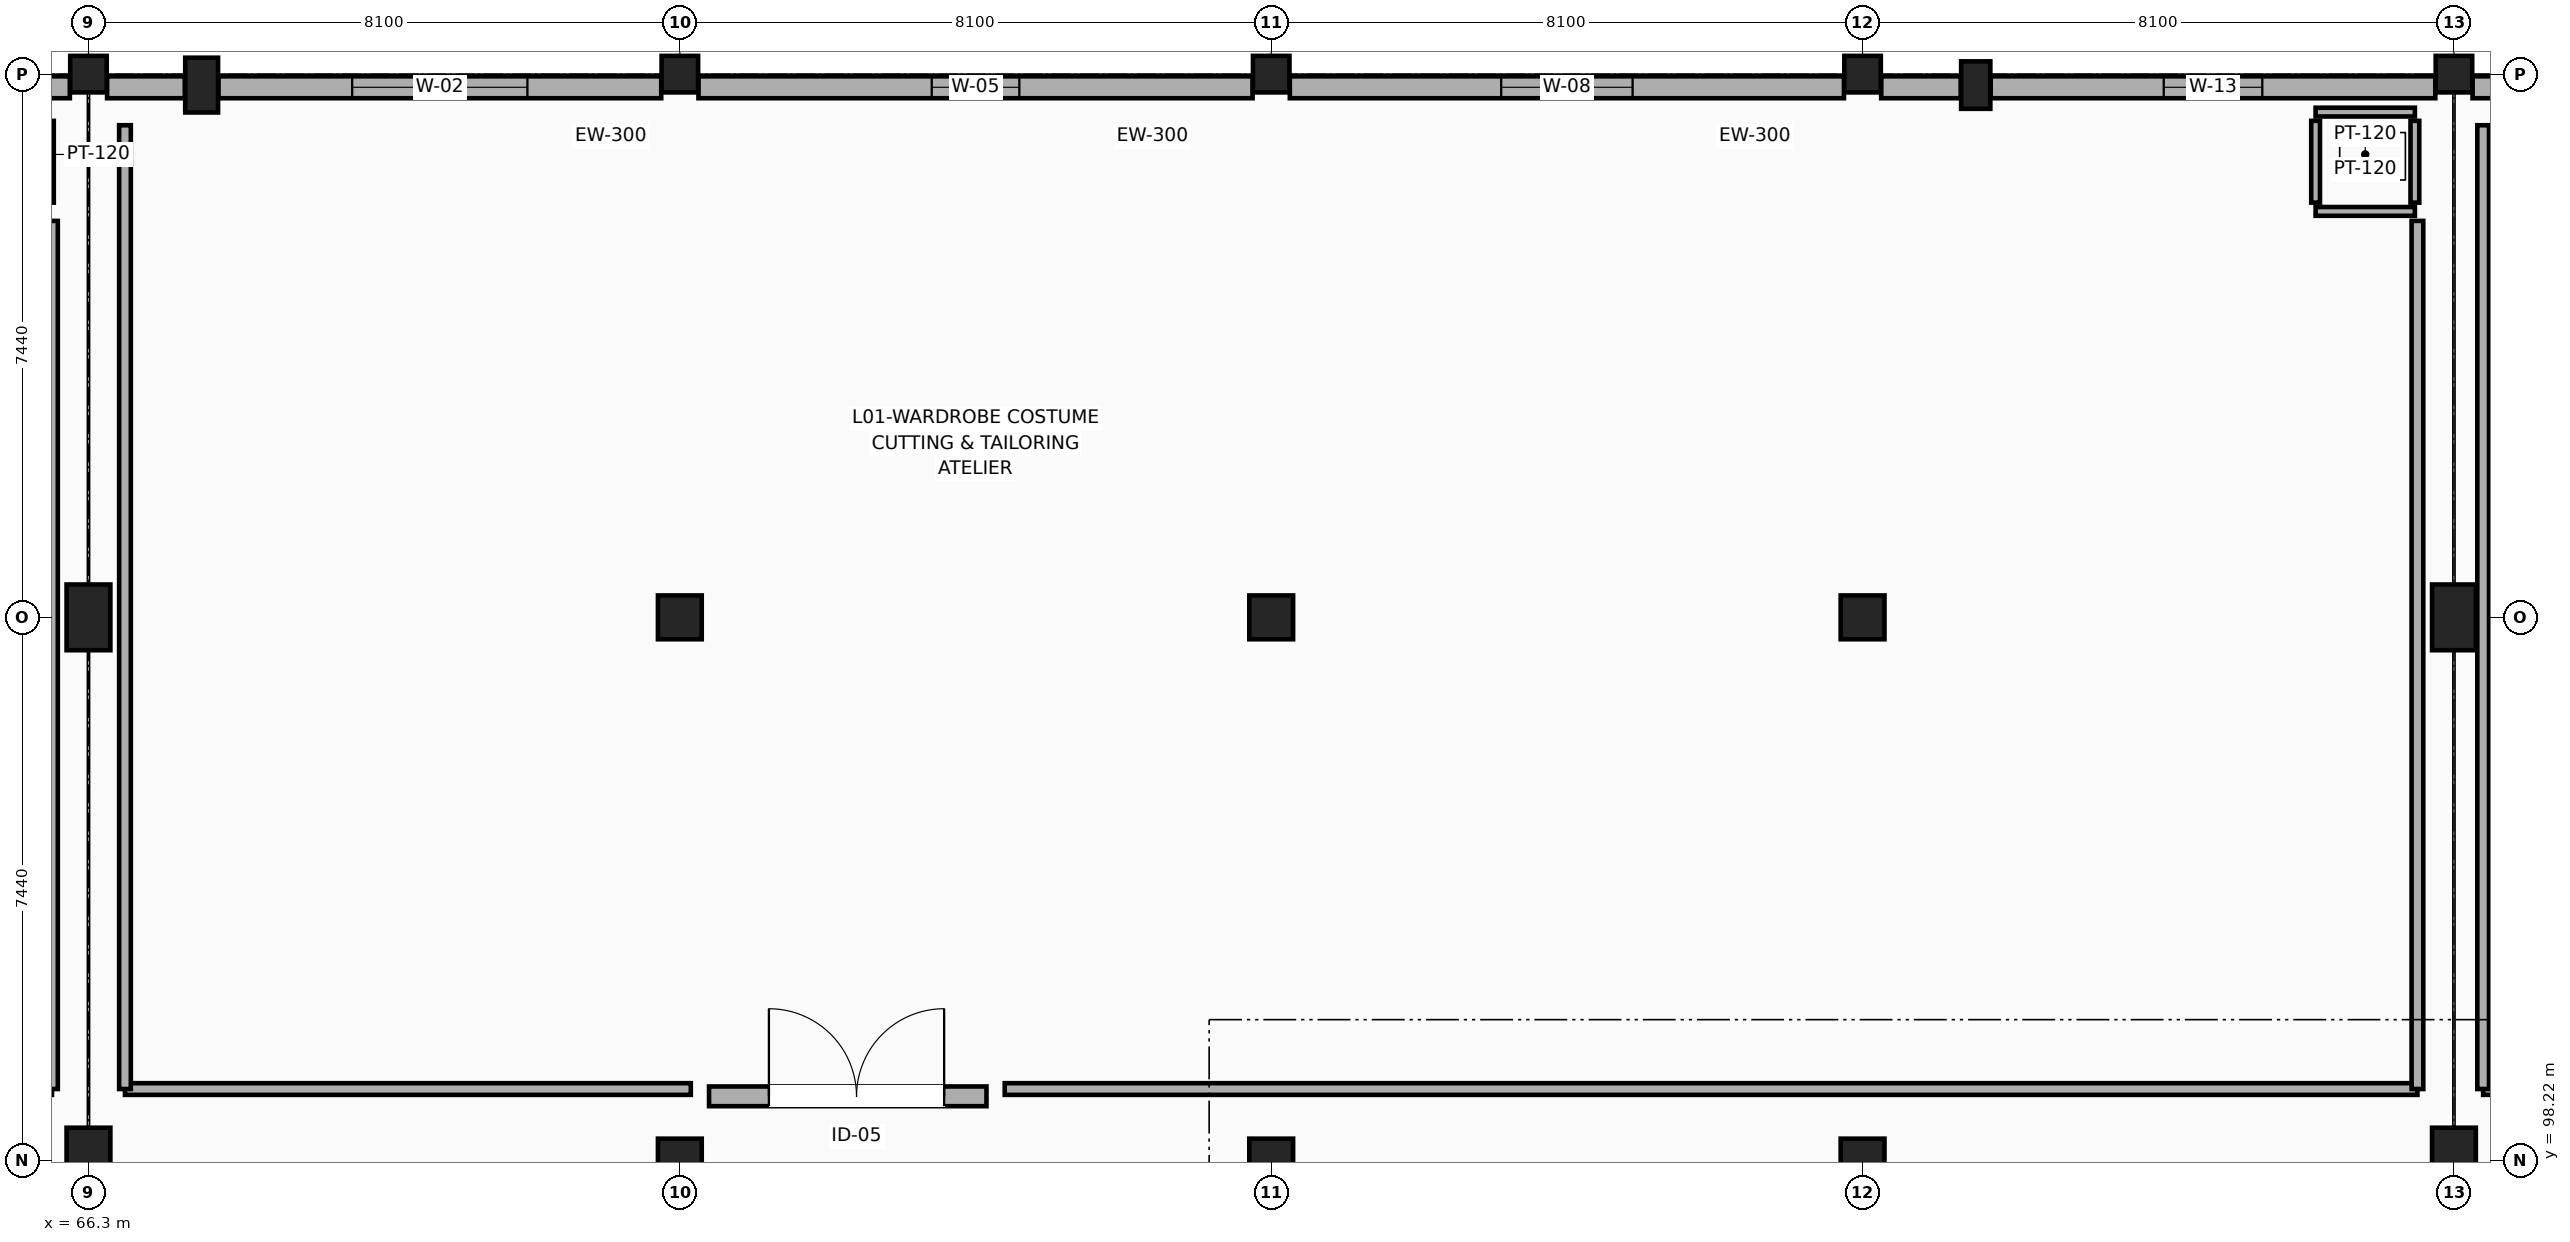
"""IFC4 building model, lengths in metres.
Left out: names, types, materials, properties, quantities, classifications, styles, units other than length and angle.
Written with IfcOpenShell. Run it as: python <this file> out.ifc"""

import sys

from ifc_helpers import new_model, si_unit, direction, frame, frame_2d, origin, origin_2d, place, context, subcontext, project, spatial, rectangle, extrude, element, fill, save


model = new_model("IFC4")
c1 = context("Model", 3, precision=1e-05, world=origin(), true_north=direction((0.0, 1.0)))
c2 = subcontext(c1, "Body", "Model", "MODEL_VIEW")
j1 = project(units=[si_unit("LENGTHUNIT", "METRE"), si_unit("PLANEANGLEUNIT", "RADIAN")], contexts=[c1])
p1 = place(None, origin())
s1 = spatial("IfcSite", under=j1, at=p1, CompositionType="ELEMENT")
p2 = place(p1, origin())
s2 = spatial("IfcBuilding", under=s1, at=p2, CompositionType="ELEMENT")
p3 = place(p2, frame((0.0, 0.0, 5.4)))
s3 = spatial("IfcBuildingStorey", under=s2, at=p3, CompositionType="ELEMENT", Elevation=5.4)
p4 = place(p3, frame((67.85, 112.95, 0.0), z_axis=(0.0, 0.0, 1.0), x_axis=(1.0, 0.0, 0.0)))
e1 = element("IfcColumn", 1, at=p4, inside=s3, PredefinedType="PILASTER", context=c2, shape_type="SweptSolid", body=[
    extrude(rectangle(XDim=0.45, YDim=0.75, at=origin_2d()), origin(), (0.0, 0.0, 1.0), 4.8),
])
p5 = place(p3, frame((92.15, 112.95, 0.0), z_axis=(0.0, 0.0, 1.0), x_axis=(1.0, 0.0, 0.0)))
e2 = element("IfcColumn", 2, at=p5, inside=s3, PredefinedType="PILASTER", context=c2, shape_type="SweptSolid", body=[
    extrude(rectangle(XDim=0.4, YDim=0.65, at=origin_2d()), origin(), (0.0, 0.0, 1.0), 4.8),
])
for number, where, z_axis, x_axis in (
    (3, (66.3, 98.22, 0.0), (0.0, 0.0, 1.0), (1.0, 0.0, 0.0)),
    (4, (66.3, 105.66, 0.0), (0.0, 0.0, 1.0), (1.0, 0.0, 0.0)),
):
    element("IfcColumn", number, at=place(p3, frame(where, z_axis=z_axis, x_axis=x_axis)), inside=s3, PredefinedType="COLUMN", context=c2, shape_type="SweptSolid", body=[
        extrude(rectangle(XDim=0.6, YDim=0.9, at=origin_2d()), origin(), (0.0, 0.0, 1.0), 4.8),
    ])
p6 = place(p3, frame((66.3, 113.1, 0.0), z_axis=(0.0, 0.0, 1.0), x_axis=(1.0, 0.0, 0.0)))
e5 = element("IfcColumn", 5, at=p6, inside=s3, PredefinedType="COLUMN", context=c2, shape_type="SweptSolid", body=[
    extrude(rectangle(XDim=0.5, YDim=0.5, at=origin_2d()), origin(), (0.0, 0.0, 1.0), 4.8),
])
for number, where, z_axis, x_axis in (
    (6, (74.4, 98.22, 0.0), (0.0, 0.0, 1.0), (1.0, 0.0, 0.0)),
    (7, (74.4, 105.66, 0.0), (0.0, 0.0, 1.0), (1.0, 0.0, 0.0)),
):
    element("IfcColumn", number, at=place(p3, frame(where, z_axis=z_axis, x_axis=x_axis)), inside=s3, PredefinedType="COLUMN", context=c2, shape_type="SweptSolid", body=[
        extrude(rectangle(XDim=0.6, YDim=0.6, at=origin_2d()), origin(), (0.0, 0.0, 1.0), 4.8),
    ])
p7 = place(p3, frame((74.4, 113.1, 0.0), z_axis=(0.0, 0.0, 1.0), x_axis=(1.0, 0.0, 0.0)))
e8 = element("IfcColumn", 8, at=p7, inside=s3, PredefinedType="COLUMN", context=c2, shape_type="SweptSolid", body=[
    extrude(rectangle(XDim=0.5, YDim=0.5, at=origin_2d()), origin(), (0.0, 0.0, 1.0), 4.8),
])
for number, where, z_axis, x_axis in (
    (9, (82.5, 98.22, 0.0), (0.0, 0.0, 1.0), (1.0, 0.0, 0.0)),
    (10, (82.5, 105.66, 0.0), (0.0, 0.0, 1.0), (1.0, 0.0, 0.0)),
):
    element("IfcColumn", number, at=place(p3, frame(where, z_axis=z_axis, x_axis=x_axis)), inside=s3, PredefinedType="COLUMN", context=c2, shape_type="SweptSolid", body=[
        extrude(rectangle(XDim=0.6, YDim=0.6, at=origin_2d()), origin(), (0.0, 0.0, 1.0), 4.8),
    ])
p8 = place(p3, frame((82.5, 113.1, 0.0), z_axis=(0.0, 0.0, 1.0), x_axis=(1.0, 0.0, 0.0)))
e11 = element("IfcColumn", 11, at=p8, inside=s3, PredefinedType="COLUMN", context=c2, shape_type="SweptSolid", body=[
    extrude(rectangle(XDim=0.5, YDim=0.5, at=origin_2d()), origin(), (0.0, 0.0, 1.0), 4.8),
])
for number, where, z_axis, x_axis in (
    (12, (90.6, 98.22, 0.0), (0.0, 0.0, 1.0), (1.0, 0.0, 0.0)),
    (13, (90.6, 105.66, 0.0), (0.0, 0.0, 1.0), (1.0, 0.0, 0.0)),
):
    element("IfcColumn", number, at=place(p3, frame(where, z_axis=z_axis, x_axis=x_axis)), inside=s3, PredefinedType="COLUMN", context=c2, shape_type="SweptSolid", body=[
        extrude(rectangle(XDim=0.6, YDim=0.6, at=origin_2d()), origin(), (0.0, 0.0, 1.0), 4.8),
    ])
p9 = place(p3, frame((90.6, 113.1, 0.0), z_axis=(0.0, 0.0, 1.0), x_axis=(1.0, 0.0, 0.0)))
e14 = element("IfcColumn", 14, at=p9, inside=s3, PredefinedType="COLUMN", context=c2, shape_type="SweptSolid", body=[
    extrude(rectangle(XDim=0.5, YDim=0.5, at=origin_2d()), origin(), (0.0, 0.0, 1.0), 4.8),
])
for number, where, z_axis, x_axis in (
    (15, (98.7, 98.22, 0.0), (0.0, 0.0, 1.0), (1.0, 0.0, 0.0)),
    (16, (98.7, 105.66, 0.0), (0.0, 0.0, 1.0), (1.0, 0.0, 0.0)),
):
    element("IfcColumn", number, at=place(p3, frame(where, z_axis=z_axis, x_axis=x_axis)), inside=s3, PredefinedType="COLUMN", context=c2, shape_type="SweptSolid", body=[
        extrude(rectangle(XDim=0.6, YDim=0.9, at=origin_2d()), origin(), (0.0, 0.0, 1.0), 4.8),
    ])
p10 = place(p3, frame((98.7, 113.1, 0.0), z_axis=(0.0, 0.0, 1.0), x_axis=(1.0, 0.0, 0.0)))
e17 = element("IfcColumn", 17, at=p10, inside=s3, PredefinedType="COLUMN", context=c2, shape_type="SweptSolid", body=[
    extrude(rectangle(XDim=0.5, YDim=0.5, at=origin_2d()), origin(), (0.0, 0.0, 1.0), 4.8),
])
p11 = place(p3, frame((58.455, 112.92, 0.0), z_axis=(0.0, 0.0, 1.0), x_axis=(1.0, 0.0, 0.0)))
e18 = element("IfcWall", 18, at=p11, inside=s3, PredefinedType="SOLIDWALL", context=c2, shape_type="SweptSolid", body=[
    extrude(rectangle(XDim=7.59, YDim=0.3, at=frame_2d((3.795, 0.0))), origin(), (0.0, 0.0, 1.0), 3.637),
])
p12 = place(p11, frame((2.995, 0.0, 0.9)))
e19 = element("IfcOpeningElement", 19, at=p12, cuts=e18, PredefinedType="OPENING", context=c2, shape_type="SweptSolid", body=[
    extrude(rectangle(XDim=1.6, YDim=1.35, at=frame_2d((0.8, 0.675))), frame((0.0, 0.16, 0.0), z_axis=(0.0, -1.0, 0.0), x_axis=(1.0, 0.0, 0.0)), (0.0, 0.0, 1.0), 0.32),
])
p13 = place(p3, frame((68.08, 112.92, 0.0), z_axis=(0.0, 0.0, 1.0), x_axis=(1.0, 0.0, 0.0)))
e20 = element("IfcWall", 20, at=p13, inside=s3, PredefinedType="SOLIDWALL", context=c2, shape_type="SweptSolid", body=[
    extrude(rectangle(XDim=6.065, YDim=0.3, at=frame_2d((3.032, 0.0))), origin(), (0.0, 0.0, 1.0), 3.637),
])
p14 = place(p13, frame((1.832, 0.0, 0.9)))
e21 = element("IfcOpeningElement", 21, at=p14, cuts=e20, PredefinedType="OPENING", context=c2, shape_type="SweptSolid", body=[
    extrude(rectangle(XDim=2.4, YDim=2.1, at=frame_2d((1.2, 1.05))), frame((0.0, 0.16, 0.0), z_axis=(0.0, -1.0, 0.0), x_axis=(1.0, 0.0, 0.0)), (0.0, 0.0, 1.0), 0.32),
])
p15 = place(p3, frame((66.555, 112.92, 0.0), z_axis=(0.0, 0.0, 1.0), x_axis=(1.0, 0.0, 0.0)))
e22 = element("IfcWall", 22, at=p15, inside=s3, PredefinedType="SOLIDWALL", context=c2, shape_type="SweptSolid", body=[
    extrude(rectangle(XDim=1.065, YDim=0.3, at=frame_2d((0.533, 0.0))), origin(), (0.0, 0.0, 1.0), 3.637),
])
p16 = place(p3, frame((74.655, 112.92, 0.0), z_axis=(0.0, 0.0, 1.0), x_axis=(1.0, 0.0, 0.0)))
e23 = element("IfcWall", 23, at=p16, inside=s3, PredefinedType="SOLIDWALL", context=c2, shape_type="SweptSolid", body=[
    extrude(rectangle(XDim=7.59, YDim=0.3, at=frame_2d((3.795, 0.0))), origin(), (0.0, 0.0, 1.0), 3.637),
])
p17 = place(p16, frame((3.195, 0.0, 0.9)))
e24 = element("IfcOpeningElement", 24, at=p17, cuts=e23, PredefinedType="OPENING", context=c2, shape_type="SweptSolid", body=[
    extrude(rectangle(XDim=1.2, YDim=1.8, at=frame_2d((0.6, 0.9))), frame((0.0, 0.16, 0.0), z_axis=(0.0, -1.0, 0.0), x_axis=(1.0, 0.0, 0.0)), (0.0, 0.0, 1.0), 0.32),
])
p18 = place(p3, frame((82.755, 112.92, 0.0), z_axis=(0.0, 0.0, 1.0), x_axis=(1.0, 0.0, 0.0)))
e25 = element("IfcWall", 25, at=p18, inside=s3, PredefinedType="SOLIDWALL", context=c2, shape_type="SweptSolid", body=[
    extrude(rectangle(XDim=7.59, YDim=0.3, at=frame_2d((3.795, 0.0))), origin(), (0.0, 0.0, 1.0), 3.637),
])
p19 = place(p18, frame((2.895, 0.0, 0.9)))
e26 = element("IfcOpeningElement", 26, at=p19, cuts=e25, PredefinedType="OPENING", context=c2, shape_type="SweptSolid", body=[
    extrude(rectangle(XDim=1.8, YDim=2.4, at=frame_2d((0.9, 1.2))), frame((0.0, 0.16, 0.0), z_axis=(0.0, -1.0, 0.0), x_axis=(1.0, 0.0, 0.0)), (0.0, 0.0, 1.0), 0.32),
])
p20 = place(p3, frame((92.355, 112.92, 0.0), z_axis=(0.0, 0.0, 1.0), x_axis=(1.0, 0.0, 0.0)))
e27 = element("IfcWall", 27, at=p20, inside=s3, PredefinedType="SOLIDWALL", context=c2, shape_type="SweptSolid", body=[
    extrude(rectangle(XDim=6.09, YDim=0.3, at=frame_2d((3.045, 0.0))), origin(), (0.0, 0.0, 1.0), 3.637),
])
p21 = place(p20, frame((2.37, 0.0, 0.9)))
e28 = element("IfcOpeningElement", 28, at=p21, cuts=e27, PredefinedType="OPENING", context=c2, shape_type="SweptSolid", body=[
    extrude(rectangle(XDim=1.35, YDim=1.95, at=frame_2d((0.675, 0.975))), frame((0.0, 0.16, 0.0), z_axis=(0.0, -1.0, 0.0), x_axis=(1.0, 0.0, 0.0)), (0.0, 0.0, 1.0), 0.32),
])
p22 = place(p3, frame((90.855, 112.92, 0.0), z_axis=(0.0, 0.0, 1.0), x_axis=(1.0, 0.0, 0.0)))
e29 = element("IfcWall", 29, at=p22, inside=s3, PredefinedType="SOLIDWALL", context=c2, shape_type="SweptSolid", body=[
    extrude(rectangle(XDim=1.09, YDim=0.3, at=frame_2d((0.545, 0.0))), origin(), (0.0, 0.0, 1.0), 3.637),
])
p23 = place(p3, frame((98.955, 112.92, 0.0), z_axis=(0.0, 0.0, 1.0), x_axis=(1.0, 0.0, 0.0)))
e30 = element("IfcWall", 30, at=p23, inside=s3, PredefinedType="SOLIDWALL", context=c2, shape_type="SweptSolid", body=[
    extrude(rectangle(XDim=1.065, YDim=0.3, at=frame_2d((0.532, 0.0))), origin(), (0.0, 0.0, 1.0), 3.637),
])
p24 = place(p3, frame((65.765, 111.34, 0.0), z_axis=(0.0, 0.0, 1.0), x_axis=(0.0, 1.0, 0.0)))
e31 = element("IfcWall", 31, at=p24, inside=s3, PredefinedType="PARTITIONING", context=c2, shape_type="SweptSolid", body=[
    extrude(rectangle(XDim=1.12, YDim=0.12, at=frame_2d((0.56, 0.0))), origin(), (0.0, 0.0, 1.0), 4.505),
])
for number, where, z_axis, x_axis in (
    (32, (96.805, 111.22, 0.0), (0.0, 0.0, 1.0), (1.0, 0.0, 0.0)),
    (33, (96.805, 112.58, 0.0), (0.0, 0.0, 1.0), (1.0, 0.0, 0.0)),
):
    element("IfcWall", number, at=place(p3, frame(where, z_axis=z_axis, x_axis=x_axis)), inside=s3, PredefinedType="PARTITIONING", context=c2, shape_type="SweptSolid", body=[
        extrude(rectangle(XDim=1.36, YDim=0.12, at=frame_2d((0.68, 0.0))), origin(), (0.0, 0.0, 1.0), 4.505),
    ])
for number, where, z_axis, x_axis in (
    (34, (96.805, 111.34, 0.0), (0.0, 0.0, 1.0), (0.0, 1.0, 0.0)),
    (35, (98.165, 111.34, 0.0), (0.0, 0.0, 1.0), (0.0, 1.0, 0.0)),
):
    element("IfcWall", number, at=place(p3, frame(where, z_axis=z_axis, x_axis=x_axis)), inside=s3, PredefinedType="PARTITIONING", context=c2, shape_type="SweptSolid", body=[
        extrude(rectangle(XDim=1.12, YDim=0.12, at=frame_2d((0.56, 0.0))), origin(), (0.0, 0.0, 1.0), 4.505),
    ])
p25 = place(p3, frame((74.8, 99.1, 0.0), z_axis=(0.0, 0.0, 1.0), x_axis=(1.0, 0.0, 0.0)))
e36 = element("IfcWall", 36, at=p25, inside=s3, PredefinedType="SOLIDWALL", context=c2, shape_type="SweptSolid", body=[
    extrude(rectangle(XDim=3.8, YDim=0.27, at=frame_2d((1.9, 0.0))), origin(), (0.0, 0.0, 1.0), 4.157),
])
p26 = place(p25, frame((0.82, 0.0, 0.0)))
e37 = element("IfcOpeningElement", 37, at=p26, cuts=e36, PredefinedType="OPENING", context=c2, shape_type="SweptSolid", body=[
    extrude(rectangle(XDim=2.4, YDim=2.8, at=frame_2d((1.2, 1.4))), frame((0.0, 0.145, 0.0), z_axis=(0.0, -1.0, 0.0), x_axis=(1.0, 0.0, 0.0)), (0.0, 0.0, 1.0), 0.29),
])
p27 = place(p3, frame((65.8, 99.2, 0.0), z_axis=(0.0, 0.0, 1.0), x_axis=(0.0, 1.0, 0.0)))
e38 = element("IfcWall", 38, at=p27, inside=s3, PredefinedType="PARTITIONING", context=c2, shape_type="SweptSolid", body=[
    extrude(rectangle(XDim=11.89, YDim=0.16, at=frame_2d((5.945, 0.0))), origin(), (0.0, 0.0, 1.0), 3.687),
])
p28 = place(p3, frame((66.8, 99.2, 0.0), z_axis=(0.0, 0.0, 1.0), x_axis=(1.0, 0.0, 0.0)))
e39 = element("IfcWall", 39, at=p28, inside=s3, PredefinedType="PARTITIONING", context=c2, shape_type="SweptSolid", body=[
    extrude(rectangle(XDim=7.75, YDim=0.16, at=frame_2d((3.875, 0.0))), origin(), (0.0, 0.0, 1.0), 3.837),
])
p29 = place(p3, frame((78.85, 99.2, 0.0), z_axis=(0.0, 0.0, 1.0), x_axis=(1.0, 0.0, 0.0)))
e40 = element("IfcWall", 40, at=p29, inside=s3, PredefinedType="PARTITIONING", context=c2, shape_type="SweptSolid", body=[
    extrude(rectangle(XDim=19.35, YDim=0.16, at=frame_2d((9.675, 0.0))), origin(), (0.0, 0.0, 1.0), 3.837),
])
p30 = place(p3, frame((66.8, 99.2, 0.0), z_axis=(0.0, 0.0, 1.0), x_axis=(0.0, 1.0, 0.0)))
e41 = element("IfcWall", 41, at=p30, inside=s3, PredefinedType="PARTITIONING", context=c2, shape_type="SweptSolid", body=[
    extrude(rectangle(XDim=13.2, YDim=0.16, at=frame_2d((6.6, 0.0))), origin(), (0.0, 0.0, 1.0), 3.987),
])
p31 = place(p3, frame((98.2, 99.2, 0.0), z_axis=(0.0, 0.0, 1.0), x_axis=(0.0, 1.0, 0.0)))
e42 = element("IfcWall", 42, at=p31, inside=s3, PredefinedType="PARTITIONING", context=c2, shape_type="SweptSolid", body=[
    extrude(rectangle(XDim=11.89, YDim=0.16, at=frame_2d((5.945, 0.0))), origin(), (0.0, 0.0, 1.0), 3.687),
])
p32 = place(p3, frame((99.1, 99.2, 0.0), z_axis=(0.0, 0.0, 1.0), x_axis=(1.0, 0.0, 0.0)))
e43 = element("IfcWall", 43, at=p32, inside=s3, PredefinedType="PARTITIONING", context=c2, shape_type="SweptSolid", body=[
    extrude(rectangle(XDim=13.85, YDim=0.16, at=frame_2d((6.925, 0.0))), origin(), (0.0, 0.0, 1.0), 3.837),
])
p33 = place(p3, frame((99.1, 99.2, 0.0), z_axis=(0.0, 0.0, 1.0), x_axis=(0.0, 1.0, 0.0)))
e44 = element("IfcWall", 44, at=p33, inside=s3, PredefinedType="PARTITIONING", context=c2, shape_type="SweptSolid", body=[
    extrude(rectangle(XDim=13.2, YDim=0.16, at=frame_2d((6.6, 0.0))), origin(), (0.0, 0.0, 1.0), 3.987),
])
p34 = place(p14, origin())
e45 = element("IfcWindow", 45, at=p34, inside=s3, PartitioningType="SINGLE_PANEL", PredefinedType="WINDOW", context=c2, shape_type="SweptSolid", body=[
    extrude(rectangle(XDim=2.4, YDim=2.1, at=frame_2d((1.2, 1.05))), frame((0.0, 0.03, 0.0), z_axis=(0.0, -1.0, 0.0), x_axis=(1.0, 0.0, 0.0)), (0.0, 0.0, 1.0), 0.06),
])
fill(e21, e45)
p35 = place(p17, origin())
e46 = element("IfcWindow", 46, at=p35, inside=s3, PartitioningType="SINGLE_PANEL", PredefinedType="WINDOW", context=c2, shape_type="SweptSolid", body=[
    extrude(rectangle(XDim=1.2, YDim=1.8, at=frame_2d((0.6, 0.9))), frame((0.0, 0.03, 0.0), z_axis=(0.0, -1.0, 0.0), x_axis=(1.0, 0.0, 0.0)), (0.0, 0.0, 1.0), 0.06),
])
fill(e24, e46)
p36 = place(p19, origin())
e47 = element("IfcWindow", 47, at=p36, inside=s3, PartitioningType="SINGLE_PANEL", PredefinedType="WINDOW", context=c2, shape_type="SweptSolid", body=[
    extrude(rectangle(XDim=1.8, YDim=2.4, at=frame_2d((0.9, 1.2))), frame((0.0, 0.03, 0.0), z_axis=(0.0, -1.0, 0.0), x_axis=(1.0, 0.0, 0.0)), (0.0, 0.0, 1.0), 0.06),
])
fill(e26, e47)
p37 = place(p21, origin())
e48 = element("IfcWindow", 48, at=p37, inside=s3, PartitioningType="SINGLE_PANEL", PredefinedType="WINDOW", context=c2, shape_type="SweptSolid", body=[
    extrude(rectangle(XDim=1.35, YDim=1.95, at=frame_2d((0.675, 0.975))), frame((0.0, 0.03, 0.0), z_axis=(0.0, -1.0, 0.0), x_axis=(1.0, 0.0, 0.0)), (0.0, 0.0, 1.0), 0.06),
])
fill(e28, e48)
p38 = place(p26, origin())
e49 = element("IfcDoor", 49, at=p38, inside=s3, OperationType="DOUBLE_DOOR_SINGLE_SWING", PredefinedType="DOOR", context=c2, shape_type="SweptSolid", body=[
    extrude(rectangle(XDim=2.4, YDim=2.8, at=frame_2d((1.2, 1.4))), frame((0.0, 0.025, 0.0), z_axis=(0.0, -1.0, 0.0), x_axis=(1.0, 0.0, 0.0)), (0.0, 0.0, 1.0), 0.05),
])
fill(e37, e49)
save(model, sys.argv[1])
